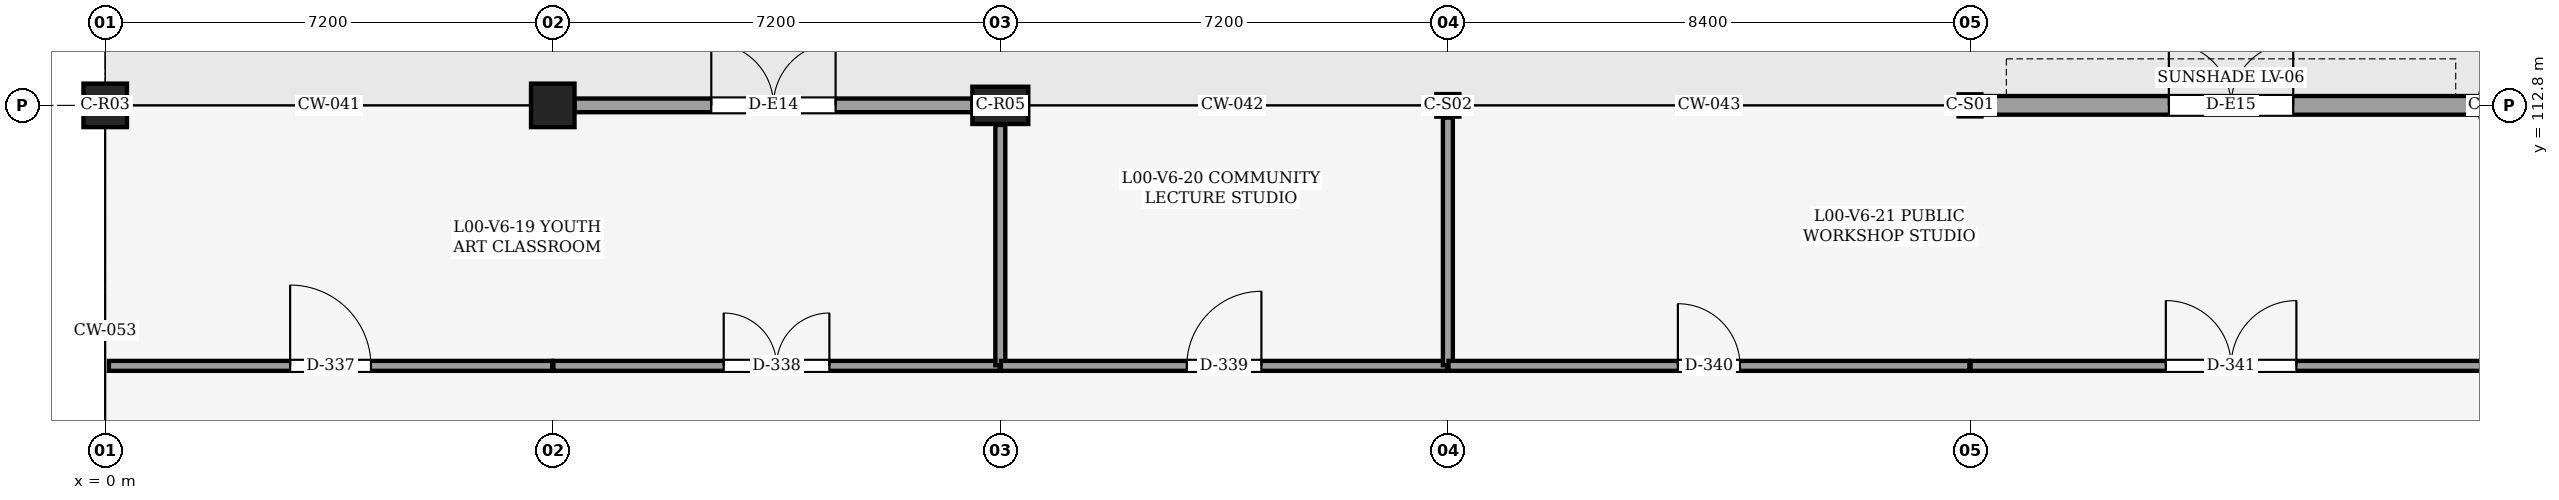
"""IFC4 building model, lengths in metres.
Left out: names, types, materials, properties, quantities, classifications, styles, units other than length and angle.
Written with IfcOpenShell. Run it as: python <this file> out.ifc"""

import sys

from ifc_helpers import new_model, si_unit, direction, frame, frame_2d, origin, origin_2d, place, context, subcontext, project, spatial, rectangle, i_section, extrude, element, fill, save


model = new_model("IFC4")
c1 = context("Model", 3, precision=1e-05, world=origin(), true_north=direction((0.0, 1.0)))
c2 = subcontext(c1, "Body", "Model", "MODEL_VIEW")
j1 = project(units=[si_unit("LENGTHUNIT", "METRE"), si_unit("PLANEANGLEUNIT", "RADIAN")], contexts=[c1])
p1 = place(None, origin())
s1 = spatial("IfcSite", under=j1, at=p1, CompositionType="ELEMENT")
p2 = place(p1, origin())
s2 = spatial("IfcBuilding", under=s1, at=p2, CompositionType="ELEMENT")
p3 = place(p2, origin())
s3 = spatial("IfcBuildingStorey", under=s2, at=p3, CompositionType="ELEMENT", Elevation=0.0)
for number, where, z_axis, x_axis in (
    (1, (0.0, 112.8, 0.0), (0.0, 0.0, 1.0), (1.0, 0.0, 0.0)),
    (2, (7.2, 112.8, 0.0), (0.0, 0.0, 1.0), (1.0, 0.0, 0.0)),
):
    element("IfcColumn", number, at=place(p3, frame(where, z_axis=z_axis, x_axis=x_axis)), inside=s3, PredefinedType="COLUMN", context=c2, shape_type="SweptSolid", body=[
        extrude(rectangle(XDim=0.7, YDim=0.7, at=origin_2d()), origin(), (0.0, 0.0, 1.0), 5.4),
    ])
p4 = place(p3, frame((14.4, 112.8, 0.0), z_axis=(0.0, 0.0, 1.0), x_axis=(1.0, 0.0, 0.0)))
e3 = element("IfcColumn", 3, at=p4, inside=s3, PredefinedType="COLUMN", context=c2, shape_type="SweptSolid", body=[
    extrude(rectangle(XDim=0.9, YDim=0.6, at=origin_2d()), origin(), (0.0, 0.0, 1.0), 5.4),
])
p5 = place(p3, frame((21.6, 112.8, 0.0), z_axis=(0.0, 0.0, 1.0), x_axis=(1.0, 0.0, 0.0)))
e4 = element("IfcColumn", 4, at=p5, inside=s3, PredefinedType="COLUMN", context=c2, shape_type="SweptSolid", body=[
    extrude(i_section(OverallWidth=0.371, OverallDepth=0.363, WebThickness=0.013, FlangeThickness=0.022, FilletRadius=0.025, at=origin_2d()), origin(), (0.0, 0.0, 1.0), 5.4),
])
p6 = place(p3, frame((30.0, 112.8, 0.0), z_axis=(0.0, 0.0, 1.0), x_axis=(1.0, 0.0, 0.0)))
e5 = element("IfcColumn", 5, at=p6, inside=s3, PredefinedType="COLUMN", context=c2, shape_type="SweptSolid", body=[
    extrude(i_section(OverallWidth=0.368, OverallDepth=0.356, WebThickness=0.011, FlangeThickness=0.018, FilletRadius=0.025, at=origin_2d()), origin(), (0.0, 0.0, 1.0), 5.4),
])
p7 = place(p3, frame((7.55, 112.8, 0.0), z_axis=(0.0, 0.0, 1.0), x_axis=(1.0, 0.0, 0.0)))
e6 = element("IfcWall", 6, at=p7, inside=s3, PredefinedType="SOLIDWALL", context=c2, shape_type="SweptSolid", body=[
    extrude(rectangle(XDim=6.4, YDim=0.22, at=frame_2d((3.2, 0.0))), origin(), (0.0, 0.0, 1.0), 4.835),
])
p8 = place(p7, frame((2.2, 0.0, 0.0)))
e7 = element("IfcOpeningElement", 7, at=p8, cuts=e6, PredefinedType="OPENING", context=c2, shape_type="SweptSolid", body=[
    extrude(rectangle(XDim=2.0, YDim=2.25, at=frame_2d((1.0, 1.125))), frame((0.0, 0.12, 0.0), z_axis=(0.0, -1.0, 0.0), x_axis=(1.0, 0.0, 0.0)), (0.0, 0.0, 1.0), 0.24),
])
p9 = place(p3, frame((30.184, 112.8, 0.0), z_axis=(0.0, 0.0, 1.0), x_axis=(1.0, 0.0, 0.0)))
e8 = element("IfcWall", 8, at=p9, inside=s3, PredefinedType="SOLIDWALL", context=c2, shape_type="SweptSolid", body=[
    extrude(rectangle(XDim=8.029, YDim=0.3, at=frame_2d((4.015, 0.0))), origin(), (0.0, 0.0, 1.0), 4.835),
])
p10 = place(p9, frame((3.015, 0.0, 0.0)))
e9 = element("IfcOpeningElement", 9, at=p10, cuts=e8, PredefinedType="OPENING", context=c2, shape_type="SweptSolid", body=[
    extrude(rectangle(XDim=2.0, YDim=2.25, at=frame_2d((1.0, 1.125))), frame((0.0, 0.16, 0.0), z_axis=(0.0, -1.0, 0.0), x_axis=(1.0, 0.0, 0.0)), (0.0, 0.0, 1.0), 0.321),
])
p11 = place(p3, frame((0.06, 108.61, 0.0), z_axis=(0.0, 0.0, 1.0), x_axis=(1.0, 0.0, 0.0)))
e10 = element("IfcWall", 10, at=p11, inside=s3, PredefinedType="PARTITIONING", context=c2, shape_type="SweptSolid", body=[
    extrude(rectangle(XDim=7.13, YDim=0.16, at=frame_2d((3.565, 0.0))), origin(), (0.0, 0.0, 1.0), 5.14),
])
p12 = place(p11, frame((2.915, 0.0, 0.0)))
e11 = element("IfcOpeningElement", 11, at=p12, cuts=e10, PredefinedType="OPENING", context=c2, shape_type="SweptSolid", body=[
    extrude(rectangle(XDim=1.3, YDim=2.2, at=frame_2d((0.65, 1.1))), frame((0.0, 0.09, 0.0), z_axis=(0.0, -1.0, 0.0), x_axis=(1.0, 0.0, 0.0)), (0.0, 0.0, 1.0), 0.18),
])
p13 = place(p3, frame((7.21, 108.61, 0.0), z_axis=(0.0, 0.0, 1.0), x_axis=(1.0, 0.0, 0.0)))
e12 = element("IfcWall", 12, at=p13, inside=s3, PredefinedType="PARTITIONING", context=c2, shape_type="SweptSolid", body=[
    extrude(rectangle(XDim=7.18, YDim=0.16, at=frame_2d((3.59, 0.0))), origin(), (0.0, 0.0, 1.0), 5.14),
])
p14 = place(p13, frame((2.74, 0.0, 0.0)))
e13 = element("IfcOpeningElement", 13, at=p14, cuts=e12, PredefinedType="OPENING", context=c2, shape_type="SweptSolid", body=[
    extrude(rectangle(XDim=1.7, YDim=2.4, at=frame_2d((0.85, 1.2))), frame((0.0, 0.09, 0.0), z_axis=(0.0, -1.0, 0.0), x_axis=(1.0, 0.0, 0.0)), (0.0, 0.0, 1.0), 0.18),
])
p15 = place(p3, frame((14.4, 108.62, 0.0), z_axis=(0.0, 0.0, 1.0), x_axis=(0.0, 1.0, 0.0)))
e14 = element("IfcWall", 14, at=p15, inside=s3, PredefinedType="PARTITIONING", context=c2, shape_type="SweptSolid", body=[
    extrude(rectangle(XDim=3.865, YDim=0.16, at=frame_2d((1.933, 0.0))), origin(), (0.0, 0.0, 1.0), 4.607),
])
p16 = place(p3, frame((14.41, 108.61, 0.0), z_axis=(0.0, 0.0, 1.0), x_axis=(1.0, 0.0, 0.0)))
e15 = element("IfcWall", 15, at=p16, inside=s3, PredefinedType="PARTITIONING", context=c2, shape_type="SweptSolid", body=[
    extrude(rectangle(XDim=7.18, YDim=0.16, at=frame_2d((3.59, 0.0))), origin(), (0.0, 0.0, 1.0), 5.14),
])
p17 = place(p16, frame((2.99, 0.0, 0.0)))
e16 = element("IfcOpeningElement", 16, at=p17, cuts=e15, PredefinedType="OPENING", context=c2, shape_type="SweptSolid", body=[
    extrude(rectangle(XDim=1.2, YDim=2.2, at=frame_2d((0.6, 1.1))), frame((0.0, 0.09, 0.0), z_axis=(0.0, -1.0, 0.0), x_axis=(1.0, 0.0, 0.0)), (0.0, 0.0, 1.0), 0.18),
])
p18 = place(p3, frame((21.6, 108.62, 0.0), z_axis=(0.0, 0.0, 1.0), x_axis=(0.0, 1.0, 0.0)))
e17 = element("IfcWall", 17, at=p18, inside=s3, PredefinedType="PARTITIONING", context=c2, shape_type="SweptSolid", body=[
    extrude(rectangle(XDim=3.983, YDim=0.16, at=frame_2d((1.992, 0.0))), origin(), (0.0, 0.0, 1.0), 4.678),
])
p19 = place(p3, frame((21.61, 108.61, 0.0), z_axis=(0.0, 0.0, 1.0), x_axis=(1.0, 0.0, 0.0)))
e18 = element("IfcWall", 18, at=p19, inside=s3, PredefinedType="PARTITIONING", context=c2, shape_type="SweptSolid", body=[
    extrude(rectangle(XDim=8.38, YDim=0.16, at=frame_2d((4.19, 0.0))), origin(), (0.0, 0.0, 1.0), 5.14),
])
p20 = place(p19, frame((3.69, 0.0, 0.0)))
e19 = element("IfcOpeningElement", 19, at=p20, cuts=e18, PredefinedType="OPENING", context=c2, shape_type="SweptSolid", body=[
    extrude(rectangle(XDim=1.0, YDim=2.15, at=frame_2d((0.5, 1.075))), frame((0.0, 0.09, 0.0), z_axis=(0.0, -1.0, 0.0), x_axis=(1.0, 0.0, 0.0)), (0.0, 0.0, 1.0), 0.18),
])
p21 = place(p3, frame((30.01, 108.61, 0.0), z_axis=(0.0, 0.0, 1.0), x_axis=(1.0, 0.0, 0.0)))
e20 = element("IfcWall", 20, at=p21, inside=s3, PredefinedType="PARTITIONING", context=c2, shape_type="SweptSolid", body=[
    extrude(rectangle(XDim=8.38, YDim=0.16, at=frame_2d((4.19, 0.0))), origin(), (0.0, 0.0, 1.0), 5.14),
])
p22 = place(p21, frame((3.14, 0.0, 0.0)))
e21 = element("IfcOpeningElement", 21, at=p22, cuts=e20, PredefinedType="OPENING", context=c2, shape_type="SweptSolid", body=[
    extrude(rectangle(XDim=2.1, YDim=2.5, at=frame_2d((1.05, 1.25))), frame((0.0, 0.09, 0.0), z_axis=(0.0, -1.0, 0.0), x_axis=(1.0, 0.0, 0.0)), (0.0, 0.0, 1.0), 0.18),
])
p23 = place(p8, origin())
e22 = element("IfcDoor", 22, at=p23, inside=s3, OperationType="DOUBLE_DOOR_SINGLE_SWING", PredefinedType="DOOR", context=c2, shape_type="SweptSolid", body=[
    extrude(rectangle(XDim=2.0, YDim=2.25, at=frame_2d((1.0, 1.125))), frame((0.0, 0.025, 0.0), z_axis=(0.0, -1.0, 0.0), x_axis=(1.0, 0.0, 0.0)), (0.0, 0.0, 1.0), 0.05),
])
fill(e7, e22)
p24 = place(p10, origin())
e23 = element("IfcDoor", 23, at=p24, inside=s3, OperationType="DOUBLE_DOOR_SINGLE_SWING", PredefinedType="DOOR", context=c2, shape_type="SweptSolid", body=[
    extrude(rectangle(XDim=2.0, YDim=2.25, at=frame_2d((1.0, 1.125))), frame((0.0, 0.025, 0.0), z_axis=(0.0, -1.0, 0.0), x_axis=(1.0, 0.0, 0.0)), (0.0, 0.0, 1.0), 0.05),
])
fill(e9, e23)
p25 = place(p12, origin())
e24 = element("IfcDoor", 24, at=p25, inside=s3, OperationType="SINGLE_SWING_LEFT", PredefinedType="DOOR", context=c2, shape_type="SweptSolid", body=[
    extrude(rectangle(XDim=1.3, YDim=2.2, at=frame_2d((0.65, 1.1))), frame((0.0, 0.025, 0.0), z_axis=(0.0, -1.0, 0.0), x_axis=(1.0, 0.0, 0.0)), (0.0, 0.0, 1.0), 0.05),
])
fill(e11, e24)
p26 = place(p14, origin())
e25 = element("IfcDoor", 25, at=p26, inside=s3, OperationType="DOUBLE_DOOR_SINGLE_SWING", PredefinedType="DOOR", context=c2, shape_type="SweptSolid", body=[
    extrude(rectangle(XDim=1.7, YDim=2.4, at=frame_2d((0.85, 1.2))), frame((0.0, 0.025, 0.0), z_axis=(0.0, -1.0, 0.0), x_axis=(1.0, 0.0, 0.0)), (0.0, 0.0, 1.0), 0.05),
])
fill(e13, e25)
p27 = place(p17, origin())
e26 = element("IfcDoor", 26, at=p27, inside=s3, OperationType="SINGLE_SWING_RIGHT", PredefinedType="DOOR", context=c2, shape_type="SweptSolid", body=[
    extrude(rectangle(XDim=1.2, YDim=2.2, at=frame_2d((0.6, 1.1))), frame((0.0, 0.025, 0.0), z_axis=(0.0, -1.0, 0.0), x_axis=(1.0, 0.0, 0.0)), (0.0, 0.0, 1.0), 0.05),
])
fill(e16, e26)
p28 = place(p20, origin())
e27 = element("IfcDoor", 27, at=p28, inside=s3, OperationType="SINGLE_SWING_LEFT", PredefinedType="DOOR", context=c2, shape_type="SweptSolid", body=[
    extrude(rectangle(XDim=1.0, YDim=2.15, at=frame_2d((0.5, 1.075))), frame((0.0, 0.025, 0.0), z_axis=(0.0, -1.0, 0.0), x_axis=(1.0, 0.0, 0.0)), (0.0, 0.0, 1.0), 0.05),
])
fill(e19, e27)
p29 = place(p22, origin())
e28 = element("IfcDoor", 28, at=p29, inside=s3, OperationType="DOUBLE_DOOR_SINGLE_SWING", PredefinedType="DOOR", context=c2, shape_type="SweptSolid", body=[
    extrude(rectangle(XDim=2.1, YDim=2.5, at=frame_2d((1.05, 1.25))), frame((0.0, 0.025, 0.0), z_axis=(0.0, -1.0, 0.0), x_axis=(1.0, 0.0, 0.0)), (0.0, 0.0, 1.0), 0.05),
])
fill(e21, e28)
save(model, sys.argv[1])
